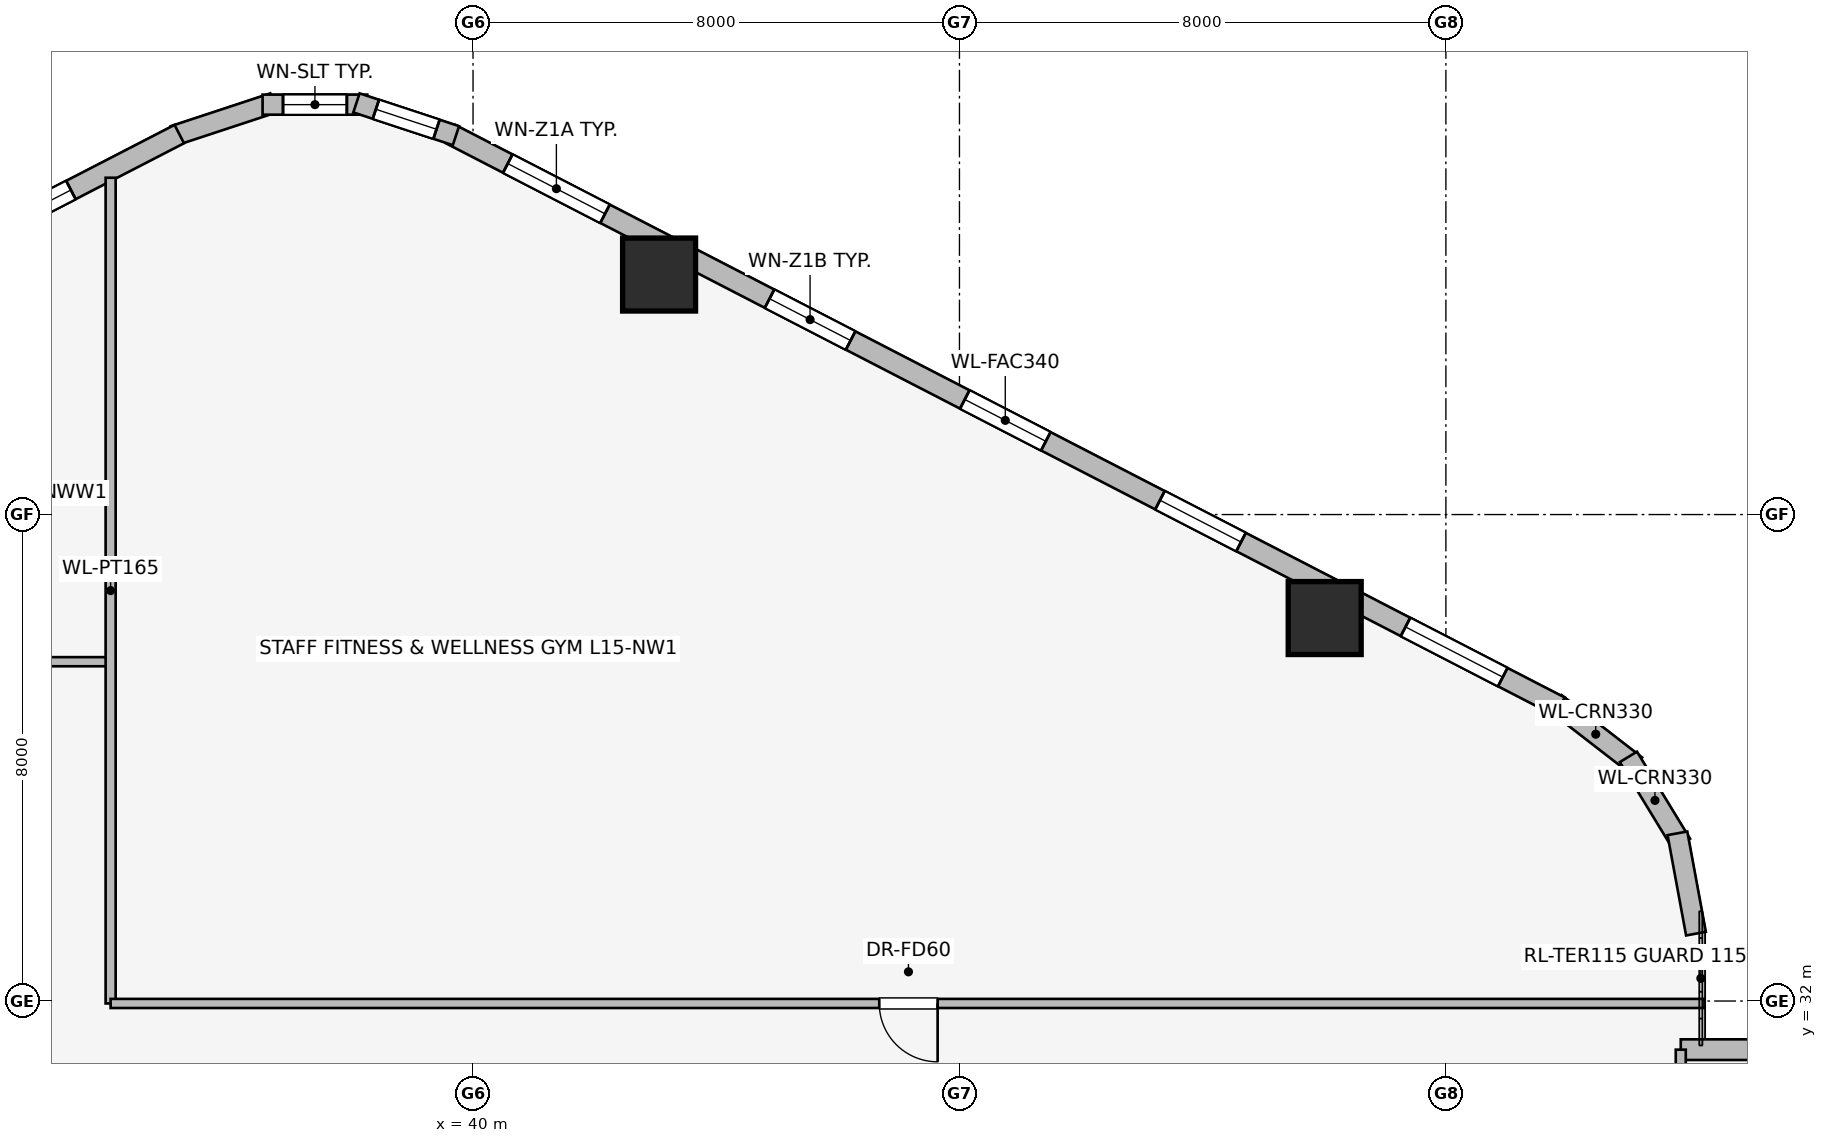
"""IFC4 building model, lengths in metres.
Left out: names, types, materials, properties, quantities, classifications, styles, units other than length and angle.
Written with IfcOpenShell. Run it as: python <this file> out.ifc"""

import sys

from ifc_helpers import new_model, si_unit, direction, frame, frame_2d, origin, origin_2d, place, context, subcontext, project, spatial, rectangle, extrude, element, fill, save


model = new_model("IFC4")
c1 = context("Model", 3, precision=1e-05, world=origin(), true_north=direction((0.0, 1.0)))
c2 = subcontext(c1, "Body", "Model", "MODEL_VIEW")
j1 = project(units=[si_unit("LENGTHUNIT", "METRE"), si_unit("PLANEANGLEUNIT", "RADIAN")], contexts=[c1])
p1 = place(None, origin())
s1 = spatial("IfcSite", under=j1, at=p1, CompositionType="ELEMENT")
p2 = place(p1, origin())
s2 = spatial("IfcBuilding", under=s1, at=p2, CompositionType="ELEMENT")
p3 = place(p2, frame((0.0, 0.0, 59.85)))
s3 = spatial("IfcBuildingStorey", under=s2, at=p3, CompositionType="ELEMENT", Elevation=59.85)
for number, where, z_axis, x_axis in (
    (1, (54.007, 38.298, 0.0), (0.0, 0.0, 1.0), (1.0, 0.0, 0.0)),
    (2, (43.06, 43.947, 0.0), (0.0, 0.0, 1.0), (1.0, 0.0, 0.0)),
):
    element("IfcColumn", number, at=place(p3, frame(where, z_axis=z_axis, x_axis=x_axis)), inside=s3, PredefinedType="COLUMN", context=c2, shape_type="SweptSolid", body=[
        extrude(rectangle(XDim=1.2, YDim=1.2, at=origin_2d()), origin(), (0.0, 0.0, 1.0), 3.65),
    ])
p4 = place(p3, frame((57.802, 36.901, 0.0), z_axis=(0.0, 0.0, 1.0), x_axis=(0.790691856293, -0.61221433207, 0.0)))
e3 = element("IfcWall", 3, at=p4, inside=s3, PredefinedType="STANDARD", context=c2, shape_type="SweptSolid", body=[
    extrude(rectangle(XDim=1.676, YDim=0.33, at=frame_2d((0.838, 0.0))), origin(), (0.0, 0.0, 1.0), 3.39),
])
p5 = place(p3, frame((59.002, 36.015, 0.0), z_axis=(0.0, 0.0, 1.0), x_axis=(0.520584129191, -0.853810379671, 0.0)))
e4 = element("IfcWall", 4, at=p5, inside=s3, PredefinedType="STANDARD", context=c2, shape_type="SweptSolid", body=[
    extrude(rectangle(XDim=1.677, YDim=0.33, at=frame_2d((0.838, 0.0))), origin(), (0.0, 0.0, 1.0), 3.39),
])
p6 = place(p3, frame((59.808, 34.758, 0.0), z_axis=(0.0, 0.0, 1.0), x_axis=(0.181714143354, -0.983351397063, 0.0)))
e5 = element("IfcWall", 5, at=p6, inside=s3, PredefinedType="STANDARD", context=c2, shape_type="SweptSolid", body=[
    extrude(rectangle(XDim=1.678, YDim=0.33, at=frame_2d((0.839, 0.0))), origin(), (0.0, 0.0, 1.0), 3.39),
])
p7 = place(p3, frame((39.631, 46.257, 0.0), z_axis=(0.0, 0.0, 1.0), x_axis=(0.888634413993, -0.458616264721, 0.0)))
e6 = element("IfcWall", 6, at=p7, inside=s3, PredefinedType="STANDARD", context=c2, shape_type="SweptSolid", body=[
    extrude(rectangle(XDim=20.531, YDim=0.34, at=frame_2d((10.266, 0.0))), origin(), (0.0, 0.0, 1.0), 2.684),
])
p8 = place(p7, frame((1.058, 0.0, 0.75)))
e7 = element("IfcOpeningElement", 7, at=p8, cuts=e6, PredefinedType="OPENING", context=c2, shape_type="SweptSolid", body=[
    extrude(rectangle(XDim=1.8, YDim=1.5, at=frame_2d((0.9, 0.75))), frame((0.0, 0.18, 0.0), z_axis=(0.0, -1.0, 0.0), x_axis=(1.0, 0.0, 0.0)), (0.0, 0.0, 1.0), 0.36),
])
p9 = place(p7, frame((5.903, 0.0, 0.75)))
e8 = element("IfcOpeningElement", 8, at=p9, cuts=e6, PredefinedType="OPENING", context=c2, shape_type="SweptSolid", body=[
    extrude(rectangle(XDim=1.5, YDim=1.5, at=frame_2d((0.75, 0.75))), frame((0.0, 0.18, 0.0), z_axis=(0.0, -1.0, 0.0), x_axis=(1.0, 0.0, 0.0)), (0.0, 0.0, 1.0), 0.36),
])
p10 = place(p7, frame((9.516, 0.0, 0.75)))
e9 = element("IfcOpeningElement", 9, at=p10, cuts=e6, PredefinedType="OPENING", context=c2, shape_type="SweptSolid", body=[
    extrude(rectangle(XDim=1.5, YDim=1.5, at=frame_2d((0.75, 0.75))), frame((0.0, 0.18, 0.0), z_axis=(0.0, -1.0, 0.0), x_axis=(1.0, 0.0, 0.0)), (0.0, 0.0, 1.0), 0.36),
])
p11 = place(p7, frame((13.129, 0.0, 0.75)))
e10 = element("IfcOpeningElement", 10, at=p11, cuts=e6, PredefinedType="OPENING", context=c2, shape_type="SweptSolid", body=[
    extrude(rectangle(XDim=1.5, YDim=1.5, at=frame_2d((0.75, 0.75))), frame((0.0, 0.18, 0.0), z_axis=(0.0, -1.0, 0.0), x_axis=(1.0, 0.0, 0.0)), (0.0, 0.0, 1.0), 0.36),
])
p12 = place(p7, frame((17.673, 0.0, 0.75)))
e11 = element("IfcOpeningElement", 11, at=p12, cuts=e6, PredefinedType="OPENING", context=c2, shape_type="SweptSolid", body=[
    extrude(rectangle(XDim=1.8, YDim=1.5, at=frame_2d((0.9, 0.75))), frame((0.0, 0.18, 0.0), z_axis=(0.0, -1.0, 0.0), x_axis=(1.0, 0.0, 0.0)), (0.0, 0.0, 1.0), 0.36),
])
p13 = place(p3, frame((35.081, 46.231, 0.0), z_axis=(0.0, 0.0, 1.0), x_axis=(0.94976901097, 0.312951794691, 0.0)))
e12 = element("IfcWall", 12, at=p13, inside=s3, PredefinedType="STANDARD", context=c2, shape_type="SweptSolid", body=[
    extrude(rectangle(XDim=1.722, YDim=0.33, at=frame_2d((0.861, 0.0))), origin(), (0.0, 0.0, 1.0), 3.39),
])
p14 = place(p3, frame((36.539, 46.741, 0.0), z_axis=(0.0, 0.0, 1.0), x_axis=(1.0, 0.0, 0.0)))
e13 = element("IfcWall", 13, at=p14, inside=s3, PredefinedType="STANDARD", context=c2, shape_type="SweptSolid", body=[
    extrude(rectangle(XDim=1.722, YDim=0.33, at=frame_2d((0.861, 0.0))), origin(), (0.0, 0.0, 1.0), 3.39),
])
p15 = place(p14, frame((0.336, 0.0, 0.75)))
e14 = element("IfcOpeningElement", 14, at=p15, cuts=e13, PredefinedType="OPENING", context=c2, shape_type="SweptSolid", body=[
    extrude(rectangle(XDim=1.05, YDim=1.4, at=frame_2d((0.525, 0.7))), frame((0.0, 0.175, 0.0), z_axis=(0.0, -1.0, 0.0), x_axis=(1.0, 0.0, 0.0)), (0.0, 0.0, 1.0), 0.35),
])
p16 = place(p3, frame((38.083, 46.77, 0.0), z_axis=(0.0, 0.0, 1.0), x_axis=(0.94976901097, -0.312951794691, 0.0)))
e15 = element("IfcWall", 15, at=p16, inside=s3, PredefinedType="STANDARD", context=c2, shape_type="SweptSolid", body=[
    extrude(rectangle(XDim=1.722, YDim=0.33, at=frame_2d((0.861, 0.0))), origin(), (0.0, 0.0, 1.0), 3.39),
])
p17 = place(p16, frame((0.336, 0.0, 0.75)))
e16 = element("IfcOpeningElement", 16, at=p17, cuts=e15, PredefinedType="OPENING", context=c2, shape_type="SweptSolid", body=[
    extrude(rectangle(XDim=1.05, YDim=1.4, at=frame_2d((0.525, 0.7))), frame((0.0, 0.175, 0.0), z_axis=(0.0, -1.0, 0.0), x_axis=(1.0, 0.0, 0.0)), (0.0, 0.0, 1.0), 0.35),
])
p18 = place(p3, frame((16.924, 36.841, 0.0), z_axis=(0.0, 0.0, 1.0), x_axis=(0.888634413993, 0.458616264721, 0.0)))
e17 = element("IfcWall", 17, at=p18, inside=s3, PredefinedType="STANDARD", context=c2, shape_type="SweptSolid", body=[
    extrude(rectangle(XDim=20.531, YDim=0.34, at=frame_2d((10.266, 0.0))), origin(), (0.0, 0.0, 1.0), 2.684),
])
p19 = place(p18, frame((2.161, 0.0, 0.75)))
e18 = element("IfcOpeningElement", 18, at=p19, cuts=e17, PredefinedType="OPENING", context=c2, shape_type="SweptSolid", body=[
    extrude(rectangle(XDim=1.05, YDim=1.4, at=frame_2d((0.525, 0.7))), frame((0.0, 0.18, 0.0), z_axis=(0.0, -1.0, 0.0), x_axis=(1.0, 0.0, 0.0)), (0.0, 0.0, 1.0), 0.36),
])
p20 = place(p18, frame((5.903, 0.0, 0.75)))
e19 = element("IfcOpeningElement", 19, at=p20, cuts=e17, PredefinedType="OPENING", context=c2, shape_type="SweptSolid", body=[
    extrude(rectangle(XDim=1.5, YDim=1.5, at=frame_2d((0.75, 0.75))), frame((0.0, 0.18, 0.0), z_axis=(0.0, -1.0, 0.0), x_axis=(1.0, 0.0, 0.0)), (0.0, 0.0, 1.0), 0.36),
])
p21 = place(p18, frame((9.516, 0.0, 0.75)))
e20 = element("IfcOpeningElement", 20, at=p21, cuts=e17, PredefinedType="OPENING", context=c2, shape_type="SweptSolid", body=[
    extrude(rectangle(XDim=1.5, YDim=1.5, at=frame_2d((0.75, 0.75))), frame((0.0, 0.18, 0.0), z_axis=(0.0, -1.0, 0.0), x_axis=(1.0, 0.0, 0.0)), (0.0, 0.0, 1.0), 0.36),
])
p22 = place(p18, frame((13.129, 0.0, 0.75)))
e21 = element("IfcOpeningElement", 21, at=p22, cuts=e17, PredefinedType="OPENING", context=c2, shape_type="SweptSolid", body=[
    extrude(rectangle(XDim=1.5, YDim=1.5, at=frame_2d((0.75, 0.75))), frame((0.0, 0.18, 0.0), z_axis=(0.0, -1.0, 0.0), x_axis=(1.0, 0.0, 0.0)), (0.0, 0.0, 1.0), 0.36),
])
p23 = place(p18, frame((17.476, 0.0, 0.75)))
e22 = element("IfcOpeningElement", 22, at=p23, cuts=e17, PredefinedType="OPENING", context=c2, shape_type="SweptSolid", body=[
    extrude(rectangle(XDim=1.05, YDim=1.4, at=frame_2d((0.525, 0.7))), frame((0.0, 0.18, 0.0), z_axis=(0.0, -1.0, 0.0), x_axis=(1.0, 0.0, 0.0)), (0.0, 0.0, 1.0), 0.36),
])
p24 = place(p3, frame((59.863, 31.2, 0.0), z_axis=(0.0, 0.0, 1.0), x_axis=(1.0, 0.0, 0.0)))
e23 = element("IfcWall", 23, at=p24, inside=s3, PredefinedType="STANDARD", context=c2, shape_type="SweptSolid", body=[
    extrude(rectangle(XDim=19.0, YDim=0.34, at=frame_2d((9.5, 0.0))), origin(), (0.0, 0.0, 1.0), 3.39),
])
p25 = place(p24, frame((2.633, 0.0, 0.75)))
e24 = element("IfcOpeningElement", 24, at=p25, cuts=e23, PredefinedType="OPENING", context=c2, shape_type="SweptSolid", body=[
    extrude(rectangle(XDim=1.8, YDim=1.5, at=frame_2d((0.9, 0.75))), frame((0.0, 0.18, 0.0), z_axis=(0.0, -1.0, 0.0), x_axis=(1.0, 0.0, 0.0)), (0.0, 0.0, 1.0), 0.36),
])
p26 = place(p24, frame((8.6, 0.0, 0.75)))
e25 = element("IfcOpeningElement", 25, at=p26, cuts=e23, PredefinedType="OPENING", context=c2, shape_type="SweptSolid", body=[
    extrude(rectangle(XDim=1.8, YDim=1.5, at=frame_2d((0.9, 0.75))), frame((0.0, 0.18, 0.0), z_axis=(0.0, -1.0, 0.0), x_axis=(1.0, 0.0, 0.0)), (0.0, 0.0, 1.0), 0.36),
])
p27 = place(p24, frame((14.567, 0.0, 0.75)))
e26 = element("IfcOpeningElement", 26, at=p27, cuts=e23, PredefinedType="OPENING", context=c2, shape_type="SweptSolid", body=[
    extrude(rectangle(XDim=1.8, YDim=1.5, at=frame_2d((0.9, 0.75))), frame((0.0, 0.18, 0.0), z_axis=(0.0, -1.0, 0.0), x_axis=(1.0, 0.0, 0.0)), (0.0, 0.0, 1.0), 0.36),
])
p28 = place(p3, frame((34.0, 37.58, 0.0), z_axis=(0.0, 0.0, 1.0), x_axis=(-1.0, 0.0, 0.0)))
e27 = element("IfcWall", 27, at=p28, inside=s3, PredefinedType="PARTITIONING", context=c2, shape_type="SweptSolid", body=[
    extrude(rectangle(XDim=15.6, YDim=0.15, at=frame_2d((7.8, 0.0))), origin(), (0.0, 0.0, 1.0), 3.39),
])
p29 = place(p28, frame((5.195, 0.0, 0.0)))
e28 = element("IfcOpeningElement", 28, at=p29, cuts=e27, PredefinedType="OPENING", context=c2, shape_type="SweptSolid", body=[
    extrude(rectangle(XDim=0.96, YDim=2.0, at=frame_2d((0.48, 1.0))), frame((0.0, 0.085, 0.0), z_axis=(0.0, -1.0, 0.0), x_axis=(1.0, 0.0, 0.0)), (0.0, 0.0, 1.0), 0.17),
])
p30 = place(p3, frame((34.04, 31.96, 0.0), z_axis=(0.0, 0.0, 1.0), x_axis=(0.0, 1.0, 0.0)))
e29 = element("IfcWall", 29, at=p30, inside=s3, PredefinedType="PARTITIONING", context=c2, shape_type="SweptSolid", body=[
    extrude(rectangle(XDim=13.579, YDim=0.165, at=frame_2d((6.79, 0.0))), origin(), (0.0, 0.0, 1.0), 3.39),
])
p31 = place(p3, frame((60.253, 31.96, 0.0), z_axis=(0.0, 0.0, 1.0), x_axis=(-1.0, 0.0, 0.0)))
e30 = element("IfcWall", 30, at=p31, inside=s3, PredefinedType="PARTITIONING", context=c2, shape_type="SweptSolid", body=[
    extrude(rectangle(XDim=26.213, YDim=0.15, at=frame_2d((13.106, 0.0))), origin(), (0.0, 0.0, 1.0), 3.39),
])
p32 = place(p31, frame((12.612, 0.0, 0.0)))
e31 = element("IfcOpeningElement", 31, at=p32, cuts=e30, PredefinedType="OPENING", context=c2, shape_type="SweptSolid", body=[
    extrude(rectangle(XDim=0.96, YDim=2.0, at=frame_2d((0.48, 1.0))), frame((0.0, 0.085, 0.0), z_axis=(0.0, -1.0, 0.0), x_axis=(1.0, 0.0, 0.0)), (0.0, 0.0, 1.0), 0.17),
])
p33 = place(p3, frame((59.863, 16.8, 0.0), z_axis=(0.0, 0.0, 1.0), x_axis=(0.0, 1.0, 0.0)))
e32 = element("IfcWall", 32, at=p33, inside=s3, PredefinedType="PARTITIONING", context=c2, shape_type="SweptSolid", body=[
    extrude(rectangle(XDim=14.4, YDim=0.165, at=frame_2d((7.2, 0.0))), origin(), (0.0, 0.0, 1.0), 2.684),
])
p34 = place(p33, frame((2.45, 0.0, 0.0)))
e33 = element("IfcOpeningElement", 33, at=p34, cuts=e32, PredefinedType="OPENING", context=c2, shape_type="SweptSolid", body=[
    extrude(rectangle(XDim=0.96, YDim=2.0, at=frame_2d((0.48, 1.0))), frame((0.0, 0.093, 0.0), z_axis=(0.0, -1.0, 0.0), x_axis=(1.0, 0.0, 0.0)), (0.0, 0.0, 1.0), 0.185),
])
p35 = place(p8, origin())
e34 = element("IfcWindow", 34, at=p35, inside=s3, PartitioningType="SINGLE_PANEL", PredefinedType="WINDOW", context=c2, shape_type="SweptSolid", body=[
    extrude(rectangle(XDim=1.8, YDim=1.5, at=frame_2d((0.9, 0.75))), frame((0.0, 0.03, 0.0), z_axis=(0.0, -1.0, 0.0), x_axis=(1.0, 0.0, 0.0)), (0.0, 0.0, 1.0), 0.06),
])
fill(e7, e34)
p36 = place(p9, origin())
e35 = element("IfcWindow", 35, at=p36, inside=s3, PartitioningType="SINGLE_PANEL", PredefinedType="WINDOW", context=c2, shape_type="SweptSolid", body=[
    extrude(rectangle(XDim=1.5, YDim=1.5, at=frame_2d((0.75, 0.75))), frame((0.0, 0.03, 0.0), z_axis=(0.0, -1.0, 0.0), x_axis=(1.0, 0.0, 0.0)), (0.0, 0.0, 1.0), 0.06),
])
fill(e8, e35)
p37 = place(p10, origin())
e36 = element("IfcWindow", 36, at=p37, inside=s3, PartitioningType="SINGLE_PANEL", PredefinedType="WINDOW", context=c2, shape_type="SweptSolid", body=[
    extrude(rectangle(XDim=1.5, YDim=1.5, at=frame_2d((0.75, 0.75))), frame((0.0, 0.03, 0.0), z_axis=(0.0, -1.0, 0.0), x_axis=(1.0, 0.0, 0.0)), (0.0, 0.0, 1.0), 0.06),
])
fill(e9, e36)
p38 = place(p11, origin())
e37 = element("IfcWindow", 37, at=p38, inside=s3, PartitioningType="SINGLE_PANEL", PredefinedType="WINDOW", context=c2, shape_type="SweptSolid", body=[
    extrude(rectangle(XDim=1.5, YDim=1.5, at=frame_2d((0.75, 0.75))), frame((0.0, 0.03, 0.0), z_axis=(0.0, -1.0, 0.0), x_axis=(1.0, 0.0, 0.0)), (0.0, 0.0, 1.0), 0.06),
])
fill(e10, e37)
p39 = place(p12, origin())
e38 = element("IfcWindow", 38, at=p39, inside=s3, PartitioningType="SINGLE_PANEL", PredefinedType="WINDOW", context=c2, shape_type="SweptSolid", body=[
    extrude(rectangle(XDim=1.8, YDim=1.5, at=frame_2d((0.9, 0.75))), frame((0.0, 0.03, 0.0), z_axis=(0.0, -1.0, 0.0), x_axis=(1.0, 0.0, 0.0)), (0.0, 0.0, 1.0), 0.06),
])
fill(e11, e38)
p40 = place(p15, origin())
e39 = element("IfcWindow", 39, at=p40, inside=s3, PartitioningType="SINGLE_PANEL", PredefinedType="WINDOW", context=c2, shape_type="SweptSolid", body=[
    extrude(rectangle(XDim=1.05, YDim=1.4, at=frame_2d((0.525, 0.7))), frame((0.0, 0.03, 0.0), z_axis=(0.0, -1.0, 0.0), x_axis=(1.0, 0.0, 0.0)), (0.0, 0.0, 1.0), 0.06),
])
fill(e14, e39)
p41 = place(p17, origin())
e40 = element("IfcWindow", 40, at=p41, inside=s3, PartitioningType="SINGLE_PANEL", PredefinedType="WINDOW", context=c2, shape_type="SweptSolid", body=[
    extrude(rectangle(XDim=1.05, YDim=1.4, at=frame_2d((0.525, 0.7))), frame((0.0, 0.03, 0.0), z_axis=(0.0, -1.0, 0.0), x_axis=(1.0, 0.0, 0.0)), (0.0, 0.0, 1.0), 0.06),
])
fill(e16, e40)
p42 = place(p23, origin())
e41 = element("IfcWindow", 41, at=p42, inside=s3, PartitioningType="SINGLE_PANEL", PredefinedType="WINDOW", context=c2, shape_type="SweptSolid", body=[
    extrude(rectangle(XDim=1.05, YDim=1.4, at=frame_2d((0.525, 0.7))), frame((0.0, 0.03, 0.0), z_axis=(0.0, -1.0, 0.0), x_axis=(1.0, 0.0, 0.0)), (0.0, 0.0, 1.0), 0.06),
])
fill(e22, e41)
p43 = place(p32, origin())
e42 = element("IfcDoor", 42, at=p43, inside=s3, OperationType="SINGLE_SWING_LEFT", PredefinedType="DOOR", context=c2, shape_type="SweptSolid", body=[
    extrude(rectangle(XDim=0.96, YDim=2.0, at=frame_2d((0.48, 1.0))), frame((0.0, 0.025, 0.0), z_axis=(0.0, -1.0, 0.0), x_axis=(1.0, 0.0, 0.0)), (0.0, 0.0, 1.0), 0.05),
])
fill(e31, e42)
save(model, sys.argv[1])
